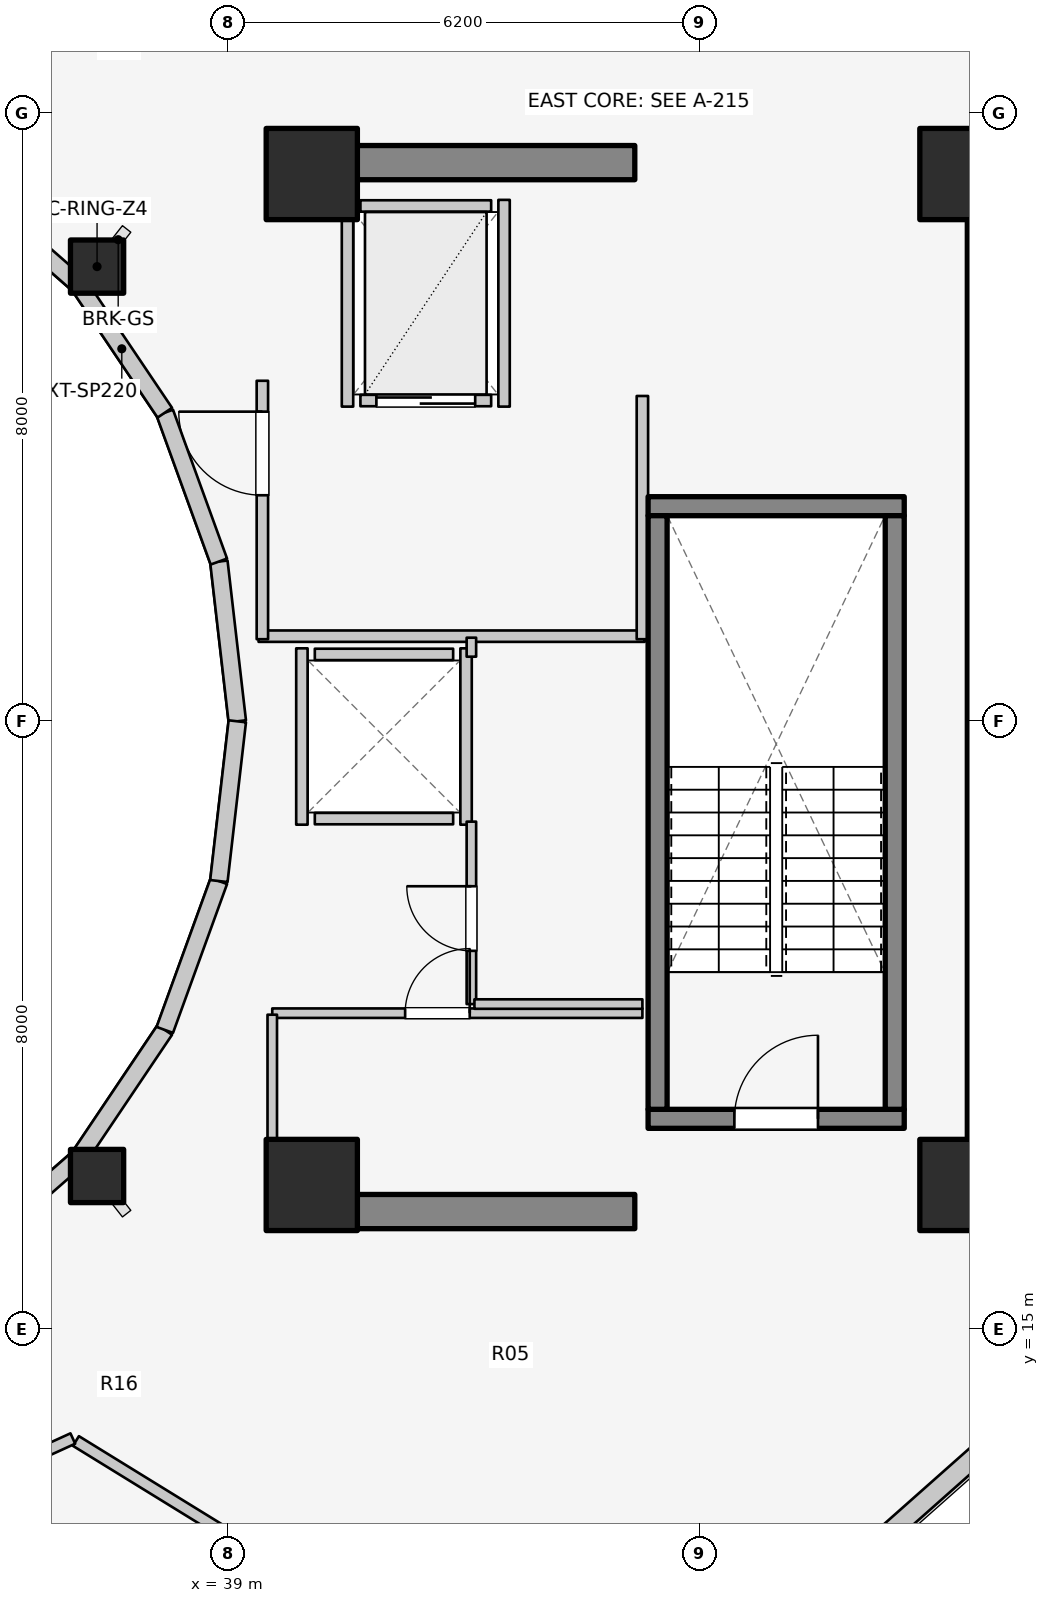
"""IFC4 building model, lengths in metres.
Left out: names, types, materials, properties, quantities, classifications, styles, units other than length and angle.
Written with IfcOpenShell. Run it as: python <this file> out.ifc"""

import sys

from ifc_helpers import new_model, si_unit, direction, frame, frame_2d, origin, origin_2d, place, context, subcontext, project, spatial, rectangle, extrude, element, fill, save


model = new_model("IFC4")
c1 = context("Model", 3, precision=1e-05, world=origin(), true_north=direction((0.0, 1.0)))
c2 = subcontext(c1, "Body", "Model", "MODEL_VIEW")
j1 = project(units=[si_unit("LENGTHUNIT", "METRE"), si_unit("PLANEANGLEUNIT", "RADIAN")], contexts=[c1])
p1 = place(None, origin())
s1 = spatial("IfcSite", under=j1, at=p1, CompositionType="ELEMENT")
p2 = place(p1, origin())
s2 = spatial("IfcBuilding", under=s1, at=p2, CompositionType="ELEMENT")
p3 = place(p2, frame((0.0, 0.0, 260.4)))
s3 = spatial("IfcBuildingStorey", under=s2, at=p3, CompositionType="ELEMENT", Elevation=260.4)
p4 = place(p3, frame((48.95, 17.05, 0.0), z_axis=(0.0, 0.0, 1.0), x_axis=(0.0, 1.0, 0.0)))
e1 = element("IfcWall", 1, at=p4, inside=s3, PredefinedType="SHEAR", context=c2, shape_type="SweptSolid", body=[
    extrude(rectangle(XDim=12.8, YDim=0.45, at=frame_2d((6.4, 0.0))), origin(), (0.0, 0.0, 1.0), 3.2),
])
for number, where, z_axis, x_axis in (
    (2, (39.85, 16.55, 0.0), (0.0, 0.0, 1.0), (1.0, 0.0, 0.0)),
    (3, (39.85, 30.35, 0.0), (0.0, 0.0, 1.0), (1.0, 0.0, 0.0)),
):
    element("IfcWall", number, at=place(p3, frame(where, z_axis=z_axis, x_axis=x_axis)), inside=s3, PredefinedType="SHEAR", context=c2, shape_type="SweptSolid", body=[
        extrude(rectangle(XDim=4.5, YDim=0.45, at=frame_2d((2.25, 0.0))), origin(), (0.0, 0.0, 1.0), 3.2),
    ])
p5 = place(p3, frame((44.525, 17.77, 0.0), z_axis=(0.0, 0.0, 1.0), x_axis=(1.0, 0.0, 0.0)))
e4 = element("IfcWall", 4, at=p5, inside=s3, PredefinedType="SOLIDWALL", context=c2, shape_type="SweptSolid", body=[
    extrude(rectangle(XDim=3.37, YDim=0.25, at=frame_2d((1.685, 0.0))), origin(), (0.0, 0.0, 1.0), 3.2),
])
p6 = place(p5, frame((1.135, 0.0, 0.0)))
e5 = element("IfcOpeningElement", 5, at=p6, cuts=e4, PredefinedType="OPENING", context=c2, shape_type="SweptSolid", body=[
    extrude(rectangle(XDim=1.1, YDim=2.1, at=frame_2d((0.55, 1.05))), frame((0.0, 0.135, 0.0), z_axis=(0.0, -1.0, 0.0), x_axis=(1.0, 0.0, 0.0)), (0.0, 0.0, 1.0), 0.27),
])
p7 = place(p3, frame((44.525, 25.83, 0.0), z_axis=(0.0, 0.0, 1.0), x_axis=(1.0, 0.0, 0.0)))
e6 = element("IfcWall", 6, at=p7, inside=s3, PredefinedType="SOLIDWALL", context=c2, shape_type="SweptSolid", body=[
    extrude(rectangle(XDim=3.37, YDim=0.25, at=frame_2d((1.685, 0.0))), origin(), (0.0, 0.0, 1.0), 3.2),
])
for number, where, z_axis, x_axis in (
    (7, (44.65, 17.895, 0.0), (0.0, 0.0, 1.0), (0.0, 1.0, 0.0)),
    (8, (47.77, 17.895, 0.0), (0.0, 0.0, 1.0), (0.0, 1.0, 0.0)),
):
    element("IfcWall", number, at=place(p3, frame(where, z_axis=z_axis, x_axis=x_axis)), inside=s3, PredefinedType="SOLIDWALL", context=c2, shape_type="SweptSolid", body=[
        extrude(rectangle(XDim=7.81, YDim=0.25, at=frame_2d((3.905, 0.0))), origin(), (0.0, 0.0, 1.0), 3.2),
    ])
for number, where, z_axis, x_axis in (
    (9, (40.1, 16.9, 0.0), (0.0, 0.0, 1.0), (1.0, 0.0, 0.0)),
    (10, (48.7, 16.9, 0.0), (0.0, 0.0, 1.0), (1.0, 0.0, 0.0)),
    (11, (48.7, 30.2, 0.0), (0.0, 0.0, 1.0), (1.0, 0.0, 0.0)),
    (12, (40.1, 30.2, 0.0), (0.0, 0.0, 1.0), (1.0, 0.0, 0.0)),
):
    element("IfcColumn", number, at=place(p3, frame(where, z_axis=z_axis, x_axis=x_axis)), inside=s3, PredefinedType="COLUMN", context=c2, shape_type="SweptSolid", body=[
        extrude(rectangle(XDim=1.2, YDim=1.2, at=origin_2d()), origin(), (0.0, 0.0, 1.0), 3.2),
    ])
for number, where, z_axis, x_axis in (
    (13, (37.275, 28.982, 0.0), (0.0, 0.0, 1.0), (1.0, 0.0, 0.0)),
    (14, (37.275, 17.018, 0.0), (0.0, 0.0, 1.0), (1.0, 0.0, 0.0)),
):
    element("IfcColumn", number, at=place(p3, frame(where, z_axis=z_axis, x_axis=x_axis)), inside=s3, PredefinedType="COLUMN", context=c2, shape_type="SweptSolid", body=[
        extrude(rectangle(XDim=0.7, YDim=0.7, at=origin_2d()), origin(), (0.0, 0.0, 1.0), 3.2),
    ])
p8 = place(p3, frame((39.12, 23.0, 0.0), z_axis=(0.0, 0.0, 1.0), x_axis=(-0.114711713601, 0.993398823617, 0.0)))
e15 = element("IfcWall", 15, at=p8, inside=s3, PredefinedType="STANDARD", context=c2, shape_type="SweptSolid", body=[
    extrude(rectangle(XDim=2.115, YDim=0.23, at=frame_2d((1.058, 0.0))), origin(), (0.0, 0.0, 1.0), 2.9),
])
p9 = place(p3, frame((38.877, 25.102, 0.0), z_axis=(0.0, 0.0, 1.0), x_axis=(-0.341423187295, 0.93990968033, 0.0)))
e16 = element("IfcWall", 16, at=p9, inside=s3, PredefinedType="STANDARD", context=c2, shape_type="SweptSolid", body=[
    extrude(rectangle(XDim=2.084, YDim=0.23, at=frame_2d((1.042, 0.0))), origin(), (0.0, 0.0, 1.0), 2.9),
])
p10 = place(p3, frame((38.166, 27.06, 0.0), z_axis=(0.0, 0.0, 1.0), x_axis=(-0.558197800898, 0.829707909492, 0.0)))
e17 = element("IfcWall", 17, at=p10, inside=s3, PredefinedType="STANDARD", context=c2, shape_type="SweptSolid", body=[
    extrude(rectangle(XDim=2.027, YDim=0.23, at=frame_2d((1.013, 0.0))), origin(), (0.0, 0.0, 1.0), 1.32),
])
for number, where, z_axis, x_axis in (
    (18, (37.035, 28.742, 0.0), (0.0, 0.0, 1.0), (-0.753, 0.659, 0.0)),
    (19, (35.56, 15.968, 0.0), (0.0, 0.0, 1.0), (0.753, 0.659, 0.0)),
):
    element("IfcWall", number, at=place(p3, frame(where, z_axis=z_axis, x_axis=x_axis)), inside=s3, PredefinedType="STANDARD", context=c2, shape_type="SweptSolid", body=[
        extrude(rectangle(XDim=1.959, YDim=0.23, at=frame_2d((0.98, 0.0))), origin(), (0.0, 0.0, 1.0), 1.32),
    ])
p11 = place(p3, frame((37.035, 17.258, 0.0), z_axis=(0.0, 0.0, 1.0), x_axis=(0.558197800898, 0.829707909492, 0.0)))
e20 = element("IfcWall", 20, at=p11, inside=s3, PredefinedType="STANDARD", context=c2, shape_type="SweptSolid", body=[
    extrude(rectangle(XDim=2.027, YDim=0.23, at=frame_2d((1.013, 0.0))), origin(), (0.0, 0.0, 1.0), 1.32),
])
p12 = place(p3, frame((38.166, 18.94, 0.0), z_axis=(0.0, 0.0, 1.0), x_axis=(0.341423187295, 0.93990968033, 0.0)))
e21 = element("IfcWall", 21, at=p12, inside=s3, PredefinedType="STANDARD", context=c2, shape_type="SweptSolid", body=[
    extrude(rectangle(XDim=2.084, YDim=0.23, at=frame_2d((1.042, 0.0))), origin(), (0.0, 0.0, 1.0), 2.9),
])
p13 = place(p3, frame((38.877, 20.898, 0.0), z_axis=(0.0, 0.0, 1.0), x_axis=(0.114711713601, 0.993398823617, 0.0)))
e22 = element("IfcWall", 22, at=p13, inside=s3, PredefinedType="STANDARD", context=c2, shape_type="SweptSolid", body=[
    extrude(rectangle(XDim=2.115, YDim=0.23, at=frame_2d((1.058, 0.0))), origin(), (0.0, 0.0, 1.0), 2.9),
])
p14 = place(p3, frame((46.846, 11.57, 0.0), z_axis=(0.0, 0.0, 1.0), x_axis=(0.74835503106, 0.663298384958, 0.0)))
e23 = element("IfcWall", 23, at=p14, inside=s3, PredefinedType="STANDARD", context=c2, shape_type="SweptSolid", body=[
    extrude(rectangle(XDim=4.084, YDim=0.26, at=frame_2d((2.042, 0.0))), origin(), (0.0, 0.0, 1.0), 1.32),
])
for number, where, z_axis, x_axis in (
    (24, (40.14, 21.72, 0.0), (0.0, 0.0, 1.0), (1.0, 0.0, 0.0)),
    (25, (40.14, 23.88, 0.0), (0.0, 0.0, 1.0), (1.0, 0.0, 0.0)),
):
    element("IfcWall", number, at=place(p3, frame(where, z_axis=z_axis, x_axis=x_axis)), inside=s3, PredefinedType="SOLIDWALL", context=c2, shape_type="SweptSolid", body=[
        extrude(rectangle(XDim=1.82, YDim=0.15, at=frame_2d((0.91, 0.0))), origin(), (0.0, 0.0, 1.0), 2.22),
    ])
p15 = place(p3, frame((39.97, 21.64, 0.0), z_axis=(0.0, 0.0, 1.0), x_axis=(0.0, 1.0, 0.0)))
e26 = element("IfcWall", 26, at=p15, inside=s3, PredefinedType="SOLIDWALL", context=c2, shape_type="SweptSolid", body=[
    extrude(rectangle(XDim=2.32, YDim=0.15, at=frame_2d((1.16, 0.0))), origin(), (0.0, 0.0, 1.0), 2.22),
])
p16 = place(p3, frame((42.13, 21.64, 0.0), z_axis=(0.0, 0.0, 1.0), x_axis=(0.0, 1.0, 0.0)))
e27 = element("IfcWall", 27, at=p16, inside=s3, PredefinedType="SOLIDWALL", context=c2, shape_type="SweptSolid", body=[
    extrude(rectangle(XDim=2.32, YDim=0.15, at=frame_2d((1.16, 0.0))), origin(), (0.0, 0.0, 1.0), 2.915),
])
p17 = place(p3, frame((40.74, 27.22, 0.0), z_axis=(0.0, 0.0, 1.0), x_axis=(1.0, 0.0, 0.0)))
e28 = element("IfcWall", 28, at=p17, inside=s3, PredefinedType="SOLIDWALL", context=c2, shape_type="SweptSolid", body=[
    extrude(rectangle(XDim=1.72, YDim=0.15, at=frame_2d((0.86, 0.0))), origin(), (0.0, 0.0, 1.0), 2.915),
])
p18 = place(p17, frame((0.21, 0.0, 0.0)))
e29 = element("IfcOpeningElement", 29, at=p18, cuts=e28, PredefinedType="OPENING", context=c2, shape_type="SweptSolid", body=[
    extrude(rectangle(XDim=1.3, YDim=2.1, at=frame_2d((0.65, 1.05))), frame((0.0, 0.085, 0.0), z_axis=(0.0, -1.0, 0.0), x_axis=(1.0, 0.0, 0.0)), (0.0, 0.0, 1.0), 0.17),
])
p19 = place(p3, frame((40.74, 29.78, 0.0), z_axis=(0.0, 0.0, 1.0), x_axis=(1.0, 0.0, 0.0)))
e30 = element("IfcWall", 30, at=p19, inside=s3, PredefinedType="SOLIDWALL", context=c2, shape_type="SweptSolid", body=[
    extrude(rectangle(XDim=1.72, YDim=0.15, at=frame_2d((0.86, 0.0))), origin(), (0.0, 0.0, 1.0), 2.915),
])
for number, where, z_axis, x_axis in (
    (31, (40.57, 27.14, 0.0), (0.0, 0.0, 1.0), (0.0, 1.0, 0.0)),
    (32, (42.63, 27.14, 0.0), (0.0, 0.0, 1.0), (0.0, 1.0, 0.0)),
):
    element("IfcWall", number, at=place(p3, frame(where, z_axis=z_axis, x_axis=x_axis)), inside=s3, PredefinedType="SOLIDWALL", context=c2, shape_type="SweptSolid", body=[
        extrude(rectangle(XDim=2.72, YDim=0.15, at=frame_2d((1.36, 0.0))), origin(), (0.0, 0.0, 1.0), 2.915),
    ])
p20 = place(p3, frame((39.4, 24.12, 0.0), z_axis=(0.0, 0.0, 1.0), x_axis=(1.0, 0.0, 0.0)))
e33 = element("IfcWall", 33, at=p20, inside=s3, PredefinedType="PARTITIONING", context=c2, shape_type="SweptSolid", body=[
    extrude(rectangle(XDim=5.08, YDim=0.15, at=frame_2d((2.54, 0.0))), origin(), (0.0, 0.0, 1.0), 2.22),
])
p21 = place(p3, frame((44.45, 24.08, 0.0), z_axis=(0.0, 0.0, 1.0), x_axis=(0.0, 1.0, 0.0)))
e34 = element("IfcWall", 34, at=p21, inside=s3, PredefinedType="PARTITIONING", context=c2, shape_type="SweptSolid", body=[
    extrude(rectangle(XDim=3.2, YDim=0.15, at=frame_2d((1.6, 0.0))), origin(), (0.0, 0.0, 1.0), 2.915),
])
p22 = place(p3, frame((39.45, 24.08, 0.0), z_axis=(0.0, 0.0, 1.0), x_axis=(0.0, 1.0, 0.0)))
e35 = element("IfcWall", 35, at=p22, inside=s3, PredefinedType="PARTITIONING", context=c2, shape_type="SweptSolid", body=[
    extrude(rectangle(XDim=3.4, YDim=0.15, at=frame_2d((1.7, 0.0))), origin(), (0.0, 0.0, 1.0), 2.915),
])
p23 = place(p22, frame((1.894, 0.0, 0.0)))
e36 = element("IfcOpeningElement", 36, at=p23, cuts=e35, PredefinedType="OPENING", context=c2, shape_type="SweptSolid", body=[
    extrude(rectangle(XDim=1.1, YDim=2.1, at=frame_2d((0.55, 1.05))), frame((0.0, 0.085, 0.0), z_axis=(0.0, -1.0, 0.0), x_axis=(1.0, 0.0, 0.0)), (0.0, 0.0, 1.0), 0.17),
])
p24 = place(p3, frame((39.58, 19.16, 0.0), z_axis=(0.0, 0.0, 1.0), x_axis=(1.0, 0.0, 0.0)))
e37 = element("IfcWall", 37, at=p24, inside=s3, PredefinedType="PARTITIONING", context=c2, shape_type="SweptSolid", body=[
    extrude(rectangle(XDim=4.87, YDim=0.125, at=frame_2d((2.435, 0.0))), origin(), (0.0, 0.0, 1.0), 2.22),
])
p25 = place(p24, frame((1.748, 0.0, 0.0)))
e38 = element("IfcOpeningElement", 38, at=p25, cuts=e37, PredefinedType="OPENING", context=c2, shape_type="SweptSolid", body=[
    extrude(rectangle(XDim=0.85, YDim=2.05, at=frame_2d((0.425, 1.025))), frame((0.0, 0.073, 0.0), z_axis=(0.0, -1.0, 0.0), x_axis=(1.0, 0.0, 0.0)), (0.0, 0.0, 1.0), 0.145),
])
p26 = place(p3, frame((39.58, 17.1, 0.0), z_axis=(0.0, 0.0, 1.0), x_axis=(0.0, 1.0, 0.0)))
e39 = element("IfcWall", 39, at=p26, inside=s3, PredefinedType="PARTITIONING", context=c2, shape_type="SweptSolid", body=[
    extrude(rectangle(XDim=2.04, YDim=0.125, at=frame_2d((1.02, 0.0))), origin(), (0.0, 0.0, 1.0), 2.491),
])
p27 = place(p3, frame((42.2, 19.28, 0.0), z_axis=(0.0, 0.0, 1.0), x_axis=(0.0, 1.0, 0.0)))
e40 = element("IfcWall", 40, at=p27, inside=s3, PredefinedType="PARTITIONING", context=c2, shape_type="SweptSolid", body=[
    extrude(rectangle(XDim=2.4, YDim=0.125, at=frame_2d((1.2, 0.0))), origin(), (0.0, 0.0, 1.0), 2.915),
])
p28 = place(p27, frame((0.7, 0.0, 0.0)))
e41 = element("IfcOpeningElement", 41, at=p28, cuts=e40, PredefinedType="OPENING", context=c2, shape_type="SweptSolid", body=[
    extrude(rectangle(XDim=0.85, YDim=2.05, at=frame_2d((0.425, 1.025))), frame((0.0, 0.073, 0.0), z_axis=(0.0, -1.0, 0.0), x_axis=(1.0, 0.0, 0.0)), (0.0, 0.0, 1.0), 0.145),
])
p29 = place(p3, frame((42.2, 23.85, 0.0), z_axis=(0.0, 0.0, 1.0), x_axis=(0.0, 1.0, 0.0)))
e42 = element("IfcWall", 42, at=p29, inside=s3, PredefinedType="PARTITIONING", context=c2, shape_type="SweptSolid", body=[
    extrude(rectangle(XDim=0.25, YDim=0.125, at=frame_2d((0.125, 0.0))), origin(), (0.0, 0.0, 1.0), 2.915),
])
p30 = place(p3, frame((42.24, 19.28, 0.0), z_axis=(0.0, 0.0, 1.0), x_axis=(1.0, 0.0, 0.0)))
e43 = element("IfcWall", 43, at=p30, inside=s3, PredefinedType="PARTITIONING", context=c2, shape_type="SweptSolid", body=[
    extrude(rectangle(XDim=2.21, YDim=0.125, at=frame_2d((1.105, 0.0))), origin(), (0.0, 0.0, 1.0), 2.22),
])
p31 = place(p3, frame((36.997, 13.531, 0.0), z_axis=(0.0, 0.0, 1.0), x_axis=(0.851425368576, -0.524475778035, 0.0)))
e44 = element("IfcWall", 44, at=p31, inside=s3, PredefinedType="PARTITIONING", context=c2, shape_type="SweptSolid", body=[
    extrude(rectangle(XDim=6.948, YDim=0.15, at=frame_2d((3.474, 0.0))), origin(), (0.0, 0.0, 1.0), 1.32),
])
p32 = place(p3, frame((34.561, 12.471, 0.0), z_axis=(0.0, 0.0, 1.0), x_axis=(0.909736731002, 0.415185597373, 0.0)))
e45 = element("IfcWall", 45, at=p32, inside=s3, PredefinedType="PARTITIONING", context=c2, shape_type="SweptSolid", body=[
    extrude(rectangle(XDim=2.633, YDim=0.15, at=frame_2d((1.317, 0.0))), origin(), (0.0, 0.0, 1.0), 1.32),
])
p33 = place(p6, origin())
e46 = element("IfcDoor", 46, at=p33, inside=s3, OperationType="SINGLE_SWING_RIGHT", PredefinedType="DOOR", context=c2, shape_type="SweptSolid", body=[
    extrude(rectangle(XDim=1.1, YDim=2.1, at=frame_2d((0.55, 1.05))), frame((0.0, 0.025, 0.0), z_axis=(0.0, -1.0, 0.0), x_axis=(1.0, 0.0, 0.0)), (0.0, 0.0, 1.0), 0.05),
])
fill(e5, e46)
p34 = place(p18, origin())
e47 = element("IfcDoor", 47, at=p34, inside=s3, OperationType="DOUBLE_DOOR_SLIDING", PredefinedType="DOOR", context=c2, shape_type="SweptSolid", body=[
    extrude(rectangle(XDim=1.3, YDim=2.1, at=frame_2d((0.65, 1.05))), frame((0.0, 0.025, 0.0), z_axis=(0.0, -1.0, 0.0), x_axis=(1.0, 0.0, 0.0)), (0.0, 0.0, 1.0), 0.05),
])
fill(e29, e47)
p35 = place(p23, origin())
e48 = element("IfcDoor", 48, at=p35, inside=s3, OperationType="SINGLE_SWING_RIGHT", PredefinedType="DOOR", context=c2, shape_type="SweptSolid", body=[
    extrude(rectangle(XDim=1.1, YDim=2.1, at=frame_2d((0.55, 1.05))), frame((0.0, 0.025, 0.0), z_axis=(0.0, -1.0, 0.0), x_axis=(1.0, 0.0, 0.0)), (0.0, 0.0, 1.0), 0.05),
])
fill(e36, e48)
p36 = place(p25, origin())
e49 = element("IfcDoor", 49, at=p36, inside=s3, OperationType="SINGLE_SWING_RIGHT", PredefinedType="DOOR", context=c2, shape_type="SweptSolid", body=[
    extrude(rectangle(XDim=0.85, YDim=2.05, at=frame_2d((0.425, 1.025))), frame((0.0, 0.025, 0.0), z_axis=(0.0, -1.0, 0.0), x_axis=(1.0, 0.0, 0.0)), (0.0, 0.0, 1.0), 0.05),
])
fill(e38, e49)
p37 = place(p28, origin())
e50 = element("IfcDoor", 50, at=p37, inside=s3, OperationType="SINGLE_SWING_RIGHT", PredefinedType="DOOR", context=c2, shape_type="SweptSolid", body=[
    extrude(rectangle(XDim=0.85, YDim=2.05, at=frame_2d((0.425, 1.025))), frame((0.0, 0.025, 0.0), z_axis=(0.0, -1.0, 0.0), x_axis=(1.0, 0.0, 0.0)), (0.0, 0.0, 1.0), 0.05),
])
fill(e41, e50)
save(model, sys.argv[1])
